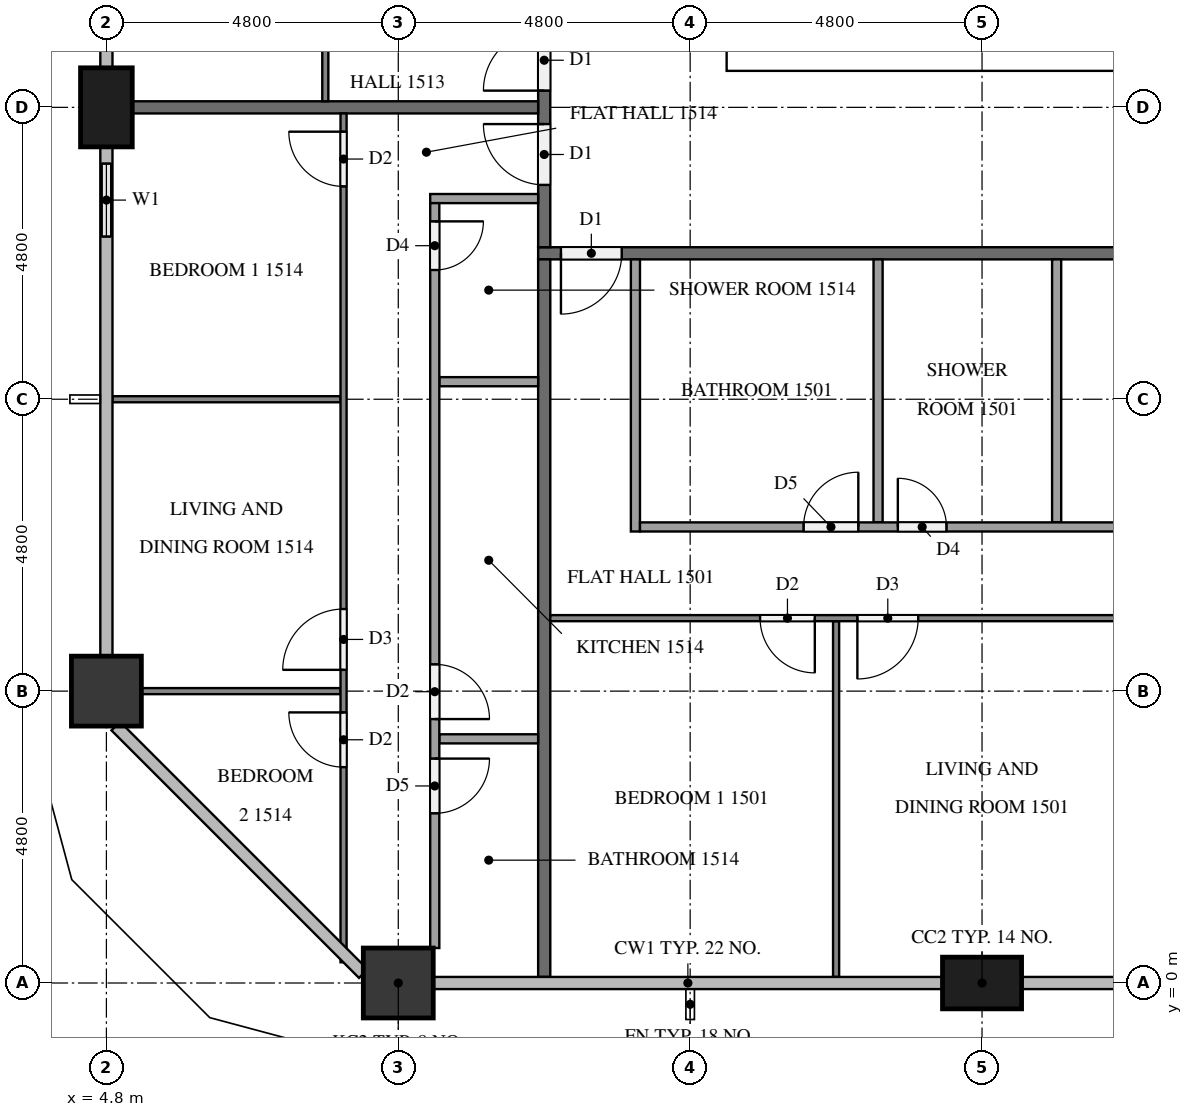
"""IFC4 building model, lengths in metres.
Left out: names, types, materials, properties, quantities, classifications, styles, units other than length and angle.
Written with IfcOpenShell. Run it as: python <this file> out.ifc"""

import sys

from ifc_helpers import new_model, si_unit, direction, frame, frame_2d, origin, origin_2d, place, context, subcontext, project, spatial, rectangle, extrude, element, fill, save


model = new_model("IFC4")
c1 = context("Model", 3, precision=1e-05, world=origin(), true_north=direction((0.0, 1.0)))
c2 = subcontext(c1, "Body", "Model", "MODEL_VIEW")
j1 = project(units=[si_unit("LENGTHUNIT", "METRE"), si_unit("PLANEANGLEUNIT", "RADIAN")], contexts=[c1])
p1 = place(None, origin())
s1 = spatial("IfcSite", under=j1, at=p1, CompositionType="ELEMENT")
p2 = place(p1, origin())
s2 = spatial("IfcBuilding", under=s1, at=p2, CompositionType="ELEMENT")
p3 = place(p2, frame((0.0, 0.0, 62.8)))
s3 = spatial("IfcBuildingStorey", under=s2, at=p3, CompositionType="ELEMENT", Elevation=62.8)
p4 = place(p3, frame((15.0, 15.45, 0.0), z_axis=(0.0, 0.0, 1.0), x_axis=(1.0, 0.0, 0.0)))
e1 = element("IfcWall", 1, at=p4, inside=s3, PredefinedType="SHEAR", context=c2, shape_type="SweptSolid", body=[
    extrude(rectangle(XDim=32.4, YDim=0.9, at=frame_2d((16.2, 0.0))), origin(), (0.0, 0.0, 1.0), 3.2),
])
p5 = place(p4, frame((15.3, 0.0, 0.0)))
e2 = element("IfcOpeningElement", 2, at=p5, cuts=e1, PredefinedType="OPENING", context=c2, shape_type="SweptSolid", body=[
    extrude(rectangle(XDim=1.8, YDim=2.1, at=frame_2d((0.9, 1.05))), frame((0.0, 0.46, 0.0), z_axis=(0.0, -1.0, 0.0), x_axis=(1.0, 0.0, 0.0)), (0.0, 0.0, 1.0), 0.92),
])
p6 = place(p3, frame((9.6, 0.0, 0.0), z_axis=(0.0, 0.0, 1.0), x_axis=(1.0, 0.0, 0.0)))
e3 = element("IfcColumn", 3, at=p6, inside=s3, PredefinedType="COLUMN", context=c2, shape_type="SweptSolid", body=[
    extrude(rectangle(XDim=1.15, YDim=1.15, at=origin_2d()), origin(), (0.0, 0.0, 1.0), 3.2),
])
for number, where, z_axis, x_axis in (
    (4, (19.2, 0.0, 0.0), (0.0, 0.0, 1.0), (1.0, 0.0, 0.0)),
    (5, (4.8, 14.4, 0.0), (0.0, 0.0, 1.0), (0.0, 1.0, 0.0)),
):
    element("IfcColumn", number, at=place(p3, frame(where, z_axis=z_axis, x_axis=x_axis)), inside=s3, PredefinedType="COLUMN", context=c2, shape_type="SweptSolid", body=[
        extrude(rectangle(XDim=1.3, YDim=0.85, at=origin_2d()), origin(), (0.0, 0.0, 1.0), 3.2),
    ])
p7 = place(p3, frame((4.8, 4.8, 0.0), z_axis=(0.0, 0.0, 1.0), x_axis=(1.0, 0.0, 0.0)))
e6 = element("IfcColumn", 6, at=p7, inside=s3, PredefinedType="COLUMN", context=c2, shape_type="SweptSolid", body=[
    extrude(rectangle(XDim=1.15, YDim=1.15, at=origin_2d()), origin(), (0.0, 0.0, 1.0), 3.2),
])
p8 = place(p3, frame((4.8, 13.75, 0.0), z_axis=(0.0, 0.0, 1.0), x_axis=(0.0, -1.0, 0.0)))
e7 = element("IfcWall", 7, at=p8, inside=s3, PredefinedType="SOLIDWALL", context=c2, shape_type="SweptSolid", body=[
    extrude(rectangle(XDim=1.75, YDim=0.15, at=frame_2d((0.875, 0.0))), origin(), (0.0, 0.0, 1.0), 3.2),
])
p9 = place(p8, frame((0.275, 0.0, 0.9)))
e8 = element("IfcOpeningElement", 8, at=p9, cuts=e7, PredefinedType="OPENING", context=c2, shape_type="SweptSolid", body=[
    extrude(rectangle(XDim=1.2, YDim=1.4, at=frame_2d((0.6, 0.7))), frame((0.0, 0.085, 0.0), z_axis=(0.0, -1.0, 0.0), x_axis=(1.0, 0.0, 0.0)), (0.0, 0.0, 1.0), 0.17),
])
p10 = place(p3, frame((50.5, 12.0, 0.0), z_axis=(0.0, 0.0, 1.0), x_axis=(-1.0, 0.0, 0.0)))
e9 = element("IfcWall", 9, at=p10, inside=s3, PredefinedType="PARTITIONING", context=c2, shape_type="SweptSolid", body=[
    extrude(rectangle(XDim=38.6, YDim=0.2, at=frame_2d((19.3, 0.0))), origin(), (0.0, 0.0, 1.0), 3.2),
])
p11 = place(p10, frame((37.225, 0.0, 0.0)))
e10 = element("IfcOpeningElement", 10, at=p11, cuts=e9, PredefinedType="OPENING", context=c2, shape_type="SweptSolid", body=[
    extrude(rectangle(XDim=1.0, YDim=2.1, at=frame_2d((0.5, 1.05))), frame((0.0, 0.11, 0.0), z_axis=(0.0, -1.0, 0.0), x_axis=(1.0, 0.0, 0.0)), (0.0, 0.0, 1.0), 0.22),
])
p12 = place(p10, frame((22.825, 0.0, 0.0)))
e11 = element("IfcOpeningElement", 11, at=p12, cuts=e9, PredefinedType="OPENING", context=c2, shape_type="SweptSolid", body=[
    extrude(rectangle(XDim=1.0, YDim=2.1, at=frame_2d((0.5, 1.05))), frame((0.0, 0.11, 0.0), z_axis=(0.0, -1.0, 0.0), x_axis=(1.0, 0.0, 0.0)), (0.0, 0.0, 1.0), 0.22),
])
p13 = place(p10, frame((0.375, 0.0, 0.0)))
e12 = element("IfcOpeningElement", 12, at=p13, cuts=e9, PredefinedType="OPENING", context=c2, shape_type="SweptSolid", body=[
    extrude(rectangle(XDim=1.0, YDim=2.1, at=frame_2d((0.5, 1.05))), frame((0.0, 0.11, 0.0), z_axis=(0.0, -1.0, 0.0), x_axis=(1.0, 0.0, 0.0)), (0.0, 0.0, 1.0), 0.22),
])
p14 = place(p3, frame((12.0, 12.1, 0.0), z_axis=(0.0, 0.0, 1.0), x_axis=(0.0, 1.0, 0.0)))
e13 = element("IfcWall", 13, at=p14, inside=s3, PredefinedType="PARTITIONING", context=c2, shape_type="SweptSolid", body=[
    extrude(rectangle(XDim=28.6, YDim=0.2, at=frame_2d((14.3, 0.0))), origin(), (0.0, 0.0, 1.0), 3.2),
])
p15 = place(p14, frame((19.375, 0.0, 0.0)))
e14 = element("IfcOpeningElement", 14, at=p15, cuts=e13, PredefinedType="OPENING", context=c2, shape_type="SweptSolid", body=[
    extrude(rectangle(XDim=1.0, YDim=2.1, at=frame_2d((0.5, 1.05))), frame((0.0, 0.11, 0.0), z_axis=(0.0, -1.0, 0.0), x_axis=(1.0, 0.0, 0.0)), (0.0, 0.0, 1.0), 0.22),
])
p16 = place(p14, frame((12.175, 0.0, 0.0)))
e15 = element("IfcOpeningElement", 15, at=p16, cuts=e13, PredefinedType="OPENING", context=c2, shape_type="SweptSolid", body=[
    extrude(rectangle(XDim=1.0, YDim=2.1, at=frame_2d((0.5, 1.05))), frame((0.0, 0.11, 0.0), z_axis=(0.0, -1.0, 0.0), x_axis=(1.0, 0.0, 0.0)), (0.0, 0.0, 1.0), 0.22),
])
p17 = place(p14, frame((2.575, 0.0, 0.0)))
e16 = element("IfcOpeningElement", 16, at=p17, cuts=e13, PredefinedType="OPENING", context=c2, shape_type="SweptSolid", body=[
    extrude(rectangle(XDim=1.0, YDim=2.1, at=frame_2d((0.5, 1.05))), frame((0.0, 0.11, 0.0), z_axis=(0.0, -1.0, 0.0), x_axis=(1.0, 0.0, 0.0)), (0.0, 0.0, 1.0), 0.22),
])
p18 = place(p14, frame((1.025, 0.0, 0.0)))
e17 = element("IfcOpeningElement", 17, at=p18, cuts=e13, PredefinedType="OPENING", context=c2, shape_type="SweptSolid", body=[
    extrude(rectangle(XDim=1.0, YDim=2.1, at=frame_2d((0.5, 1.05))), frame((0.0, 0.11, 0.0), z_axis=(0.0, -1.0, 0.0), x_axis=(1.0, 0.0, 0.0)), (0.0, 0.0, 1.0), 0.22),
])
p19 = place(p3, frame((12.0, 0.1, 0.0), z_axis=(0.0, 0.0, 1.0), x_axis=(0.0, 1.0, 0.0)))
e18 = element("IfcWall", 18, at=p19, inside=s3, PredefinedType="PARTITIONING", context=c2, shape_type="SweptSolid", body=[
    extrude(rectangle(XDim=11.8, YDim=0.2, at=frame_2d((5.9, 0.0))), origin(), (0.0, 0.0, 1.0), 3.2),
])
p20 = place(p3, frame((5.225, 14.4, 0.0), z_axis=(0.0, 0.0, 1.0), x_axis=(1.0, 0.0, 0.0)))
e19 = element("IfcWall", 19, at=p20, inside=s3, PredefinedType="PARTITIONING", context=c2, shape_type="SweptSolid", body=[
    extrude(rectangle(XDim=6.675, YDim=0.2, at=frame_2d((3.337, 0.0))), origin(), (0.0, 0.0, 1.0), 3.2),
])
p21 = place(p3, frame((16.8, 5.95, 0.0), z_axis=(0.0, 0.0, 1.0), x_axis=(0.0, -1.0, 0.0)))
e20 = element("IfcWall", 20, at=p21, inside=s3, PredefinedType="PARTITIONING", context=c2, shape_type="SweptSolid", body=[
    extrude(rectangle(XDim=5.85, YDim=0.1, at=frame_2d((2.925, 0.0))), origin(), (0.0, 0.0, 1.0), 3.2),
])
p22 = place(p3, frame((26.3, 6.0, 0.0), z_axis=(0.0, 0.0, 1.0), x_axis=(-1.0, 0.0, 0.0)))
e21 = element("IfcWall", 21, at=p22, inside=s3, PredefinedType="PARTITIONING", context=c2, shape_type="SweptSolid", body=[
    extrude(rectangle(XDim=14.2, YDim=0.1, at=frame_2d((7.1, 0.0))), origin(), (0.0, 0.0, 1.0), 3.2),
])
p23 = place(p22, frame((9.85, 0.0, 0.0)))
e22 = element("IfcOpeningElement", 22, at=p23, cuts=e21, PredefinedType="OPENING", context=c2, shape_type="SweptSolid", body=[
    extrude(rectangle(XDim=0.9, YDim=2.1, at=frame_2d((0.45, 1.05))), frame((0.0, 0.06, 0.0), z_axis=(0.0, -1.0, 0.0), x_axis=(1.0, 0.0, 0.0)), (0.0, 0.0, 1.0), 0.12),
])
p24 = place(p22, frame((8.15, 0.0, 0.0)))
e23 = element("IfcOpeningElement", 23, at=p24, cuts=e21, PredefinedType="OPENING", context=c2, shape_type="SweptSolid", body=[
    extrude(rectangle(XDim=1.0, YDim=2.1, at=frame_2d((0.5, 1.05))), frame((0.0, 0.06, 0.0), z_axis=(0.0, -1.0, 0.0), x_axis=(1.0, 0.0, 0.0)), (0.0, 0.0, 1.0), 0.12),
])
p25 = place(p22, frame((0.3, 0.0, 0.0)))
e24 = element("IfcOpeningElement", 24, at=p25, cuts=e21, PredefinedType="OPENING", context=c2, shape_type="SweptSolid", body=[
    extrude(rectangle(XDim=0.9, YDim=2.1, at=frame_2d((0.45, 1.05))), frame((0.0, 0.06, 0.0), z_axis=(0.0, -1.0, 0.0), x_axis=(1.0, 0.0, 0.0)), (0.0, 0.0, 1.0), 0.12),
])
for number, where, z_axis, x_axis in (
    (25, (17.49, 11.9, 0.0), (0.0, 0.0, 1.0), (0.0, -1.0, 0.0)),
    (26, (20.427, 11.9, 0.0), (0.0, 0.0, 1.0), (0.0, -1.0, 0.0)),
):
    element("IfcWall", number, at=place(p3, frame(where, z_axis=z_axis, x_axis=x_axis)), inside=s3, PredefinedType="PARTITIONING", context=c2, shape_type="SweptSolid", body=[
        extrude(rectangle(XDim=4.325, YDim=0.15, at=frame_2d((2.163, 0.0))), origin(), (0.0, 0.0, 1.0), 3.2),
    ])
p26 = place(p3, frame((13.5, 11.9, 0.0), z_axis=(0.0, 0.0, 1.0), x_axis=(0.0, -1.0, 0.0)))
e27 = element("IfcWall", 27, at=p26, inside=s3, PredefinedType="PARTITIONING", context=c2, shape_type="SweptSolid", body=[
    extrude(rectangle(XDim=4.475, YDim=0.15, at=frame_2d((2.237, 0.0))), origin(), (0.0, 0.0, 1.0), 3.2),
])
p27 = place(p3, frame((13.575, 7.5, 0.0), z_axis=(0.0, 0.0, 1.0), x_axis=(1.0, 0.0, 0.0)))
e28 = element("IfcWall", 28, at=p27, inside=s3, PredefinedType="PARTITIONING", context=c2, shape_type="SweptSolid", body=[
    extrude(rectangle(XDim=12.725, YDim=0.15, at=frame_2d((6.363, 0.0))), origin(), (0.0, 0.0, 1.0), 3.2),
])
p28 = place(p27, frame((2.69, 0.0, 0.0)))
e29 = element("IfcOpeningElement", 29, at=p28, cuts=e28, PredefinedType="OPENING", context=c2, shape_type="SweptSolid", body=[
    extrude(rectangle(XDim=0.9, YDim=2.1, at=frame_2d((0.45, 1.05))), frame((0.0, 0.085, 0.0), z_axis=(0.0, -1.0, 0.0), x_axis=(1.0, 0.0, 0.0)), (0.0, 0.0, 1.0), 0.17),
])
p29 = place(p27, frame((4.24, 0.0, 0.0)))
e30 = element("IfcOpeningElement", 30, at=p29, cuts=e28, PredefinedType="OPENING", context=c2, shape_type="SweptSolid", body=[
    extrude(rectangle(XDim=0.8, YDim=2.1, at=frame_2d((0.4, 1.05))), frame((0.0, 0.085, 0.0), z_axis=(0.0, -1.0, 0.0), x_axis=(1.0, 0.0, 0.0)), (0.0, 0.0, 1.0), 0.17),
])
p30 = place(p27, frame((11.475, 0.0, 0.0)))
e31 = element("IfcOpeningElement", 31, at=p30, cuts=e28, PredefinedType="OPENING", context=c2, shape_type="SweptSolid", body=[
    extrude(rectangle(XDim=0.9, YDim=2.1, at=frame_2d((0.45, 1.05))), frame((0.0, 0.085, 0.0), z_axis=(0.0, -1.0, 0.0), x_axis=(1.0, 0.0, 0.0)), (0.0, 0.0, 1.0), 0.17),
])
p31 = place(p3, frame((8.4, 14.5, 0.0), z_axis=(0.0, 0.0, 1.0), x_axis=(0.0, 1.0, 0.0)))
e32 = element("IfcWall", 32, at=p31, inside=s3, PredefinedType="PARTITIONING", context=c2, shape_type="SweptSolid", body=[
    extrude(rectangle(XDim=9.4, YDim=0.1, at=frame_2d((4.7, 0.0))), origin(), (0.0, 0.0, 1.0), 3.2),
])
p32 = place(p31, frame((3.35, 0.0, 0.0)))
e33 = element("IfcOpeningElement", 33, at=p32, cuts=e32, PredefinedType="OPENING", context=c2, shape_type="SweptSolid", body=[
    extrude(rectangle(XDim=1.0, YDim=2.1, at=frame_2d((0.5, 1.05))), frame((0.0, 0.06, 0.0), z_axis=(0.0, -1.0, 0.0), x_axis=(1.0, 0.0, 0.0)), (0.0, 0.0, 1.0), 0.12),
])
p33 = place(p31, frame((5.05, 0.0, 0.0)))
e34 = element("IfcOpeningElement", 34, at=p33, cuts=e32, PredefinedType="OPENING", context=c2, shape_type="SweptSolid", body=[
    extrude(rectangle(XDim=0.9, YDim=2.1, at=frame_2d((0.45, 1.05))), frame((0.0, 0.06, 0.0), z_axis=(0.0, -1.0, 0.0), x_axis=(1.0, 0.0, 0.0)), (0.0, 0.0, 1.0), 0.12),
])
p34 = place(p3, frame((8.65, 9.6, 0.0), z_axis=(0.0, 0.0, 1.0), x_axis=(-1.0, 0.0, 0.0)))
e35 = element("IfcWall", 35, at=p34, inside=s3, PredefinedType="PARTITIONING", context=c2, shape_type="SweptSolid", body=[
    extrude(rectangle(XDim=3.75, YDim=0.1, at=frame_2d((1.875, 0.0))), origin(), (0.0, 0.0, 1.0), 3.2),
])
p35 = place(p3, frame((8.65, 4.8, 0.0), z_axis=(0.0, 0.0, 1.0), x_axis=(-1.0, 0.0, 0.0)))
e36 = element("IfcWall", 36, at=p35, inside=s3, PredefinedType="PARTITIONING", context=c2, shape_type="SweptSolid", body=[
    extrude(rectangle(XDim=3.275, YDim=0.1, at=frame_2d((1.637, 0.0))), origin(), (0.0, 0.0, 1.0), 3.2),
])
p36 = place(p3, frame((8.7, 0.341, 0.0), z_axis=(0.0, 0.0, 1.0), x_axis=(0.0, 1.0, 0.0)))
e37 = element("IfcWall", 37, at=p36, inside=s3, PredefinedType="PARTITIONING", context=c2, shape_type="SweptSolid", body=[
    extrude(rectangle(XDim=13.959, YDim=0.1, at=frame_2d((6.979, 0.0))), origin(), (0.0, 0.0, 1.0), 3.2),
])
p37 = place(p36, frame((12.759, 0.0, 0.0)))
e38 = element("IfcOpeningElement", 38, at=p37, cuts=e37, PredefinedType="OPENING", context=c2, shape_type="SweptSolid", body=[
    extrude(rectangle(XDim=0.9, YDim=2.1, at=frame_2d((0.45, 1.05))), frame((0.0, 0.06, 0.0), z_axis=(0.0, -1.0, 0.0), x_axis=(1.0, 0.0, 0.0)), (0.0, 0.0, 1.0), 0.12),
])
p38 = place(p36, frame((4.809, 0.0, 0.0)))
e39 = element("IfcOpeningElement", 39, at=p38, cuts=e37, PredefinedType="OPENING", context=c2, shape_type="SweptSolid", body=[
    extrude(rectangle(XDim=1.0, YDim=2.1, at=frame_2d((0.5, 1.05))), frame((0.0, 0.06, 0.0), z_axis=(0.0, -1.0, 0.0), x_axis=(1.0, 0.0, 0.0)), (0.0, 0.0, 1.0), 0.12),
])
p39 = place(p36, frame((3.209, 0.0, 0.0)))
e40 = element("IfcOpeningElement", 40, at=p39, cuts=e37, PredefinedType="OPENING", context=c2, shape_type="SweptSolid", body=[
    extrude(rectangle(XDim=0.9, YDim=2.1, at=frame_2d((0.45, 1.05))), frame((0.0, 0.06, 0.0), z_axis=(0.0, -1.0, 0.0), x_axis=(1.0, 0.0, 0.0)), (0.0, 0.0, 1.0), 0.12),
])
for number, where, z_axis, x_axis in (
    (41, (11.9, 9.888, 0.0), (0.0, 0.0, 1.0), (-1.0, 0.0, 0.0)),
    (42, (11.9, 4.015, 0.0), (0.0, 0.0, 1.0), (-1.0, 0.0, 0.0)),
):
    element("IfcWall", number, at=place(p3, frame(where, z_axis=z_axis, x_axis=x_axis)), inside=s3, PredefinedType="PARTITIONING", context=c2, shape_type="SweptSolid", body=[
        extrude(rectangle(XDim=1.625, YDim=0.15, at=frame_2d((0.812, 0.0))), origin(), (0.0, 0.0, 1.0), 3.2),
    ])
p40 = place(p3, frame((11.9, 12.9, 0.0), z_axis=(0.0, 0.0, 1.0), x_axis=(-1.0, 0.0, 0.0)))
e43 = element("IfcWall", 43, at=p40, inside=s3, PredefinedType="PARTITIONING", context=c2, shape_type="SweptSolid", body=[
    extrude(rectangle(XDim=1.775, YDim=0.15, at=frame_2d((0.887, 0.0))), origin(), (0.0, 0.0, 1.0), 3.2),
])
p41 = place(p3, frame((10.2, 12.825, 0.0), z_axis=(0.0, 0.0, 1.0), x_axis=(0.0, -1.0, 0.0)))
e44 = element("IfcWall", 44, at=p41, inside=s3, PredefinedType="PARTITIONING", context=c2, shape_type="SweptSolid", body=[
    extrude(rectangle(XDim=12.25, YDim=0.15, at=frame_2d((6.125, 0.0))), origin(), (0.0, 0.0, 1.0), 3.2),
])
p42 = place(p41, frame((0.3, 0.0, 0.0)))
e45 = element("IfcOpeningElement", 45, at=p42, cuts=e44, PredefinedType="OPENING", context=c2, shape_type="SweptSolid", body=[
    extrude(rectangle(XDim=0.8, YDim=2.1, at=frame_2d((0.4, 1.05))), frame((0.0, 0.085, 0.0), z_axis=(0.0, -1.0, 0.0), x_axis=(1.0, 0.0, 0.0)), (0.0, 0.0, 1.0), 0.17),
])
p43 = place(p41, frame((7.585, 0.0, 0.0)))
e46 = element("IfcOpeningElement", 46, at=p43, cuts=e44, PredefinedType="OPENING", context=c2, shape_type="SweptSolid", body=[
    extrude(rectangle(XDim=0.9, YDim=2.1, at=frame_2d((0.45, 1.05))), frame((0.0, 0.085, 0.0), z_axis=(0.0, -1.0, 0.0), x_axis=(1.0, 0.0, 0.0)), (0.0, 0.0, 1.0), 0.17),
])
p44 = place(p41, frame((9.135, 0.0, 0.0)))
e47 = element("IfcOpeningElement", 47, at=p44, cuts=e44, PredefinedType="OPENING", context=c2, shape_type="SweptSolid", body=[
    extrude(rectangle(XDim=0.9, YDim=2.1, at=frame_2d((0.45, 1.05))), frame((0.0, 0.085, 0.0), z_axis=(0.0, -1.0, 0.0), x_axis=(1.0, 0.0, 0.0)), (0.0, 0.0, 1.0), 0.17),
])
p45 = place(p9, origin())
e48 = element("IfcWindow", 48, at=p45, inside=s3, PartitioningType="SINGLE_PANEL", PredefinedType="WINDOW", context=c2, shape_type="SweptSolid", body=[
    extrude(rectangle(XDim=1.2, YDim=1.4, at=frame_2d((0.6, 0.7))), frame((0.0, 0.03, 0.0), z_axis=(0.0, -1.0, 0.0), x_axis=(1.0, 0.0, 0.0)), (0.0, 0.0, 1.0), 0.06),
])
fill(e8, e48)
p46 = place(p11, origin())
e49 = element("IfcDoor", 49, at=p46, inside=s3, OperationType="SINGLE_SWING_RIGHT", PredefinedType="DOOR", context=c2, shape_type="SweptSolid", body=[
    extrude(rectangle(XDim=1.0, YDim=2.1, at=frame_2d((0.5, 1.05))), frame((0.0, 0.025, 0.0), z_axis=(0.0, -1.0, 0.0), x_axis=(1.0, 0.0, 0.0)), (0.0, 0.0, 1.0), 0.05),
])
fill(e10, e49)
p47 = place(p17, origin())
e50 = element("IfcDoor", 50, at=p47, inside=s3, OperationType="SINGLE_SWING_LEFT", PredefinedType="DOOR", context=c2, shape_type="SweptSolid", body=[
    extrude(rectangle(XDim=1.0, YDim=2.1, at=frame_2d((0.5, 1.05))), frame((0.0, 0.025, 0.0), z_axis=(0.0, -1.0, 0.0), x_axis=(1.0, 0.0, 0.0)), (0.0, 0.0, 1.0), 0.05),
])
fill(e16, e50)
p48 = place(p18, origin())
e51 = element("IfcDoor", 51, at=p48, inside=s3, OperationType="SINGLE_SWING_RIGHT", PredefinedType="DOOR", context=c2, shape_type="SweptSolid", body=[
    extrude(rectangle(XDim=1.0, YDim=2.1, at=frame_2d((0.5, 1.05))), frame((0.0, 0.025, 0.0), z_axis=(0.0, -1.0, 0.0), x_axis=(1.0, 0.0, 0.0)), (0.0, 0.0, 1.0), 0.05),
])
fill(e17, e51)
p49 = place(p23, origin())
e52 = element("IfcDoor", 52, at=p49, inside=s3, OperationType="SINGLE_SWING_LEFT", PredefinedType="DOOR", context=c2, shape_type="SweptSolid", body=[
    extrude(rectangle(XDim=0.9, YDim=2.1, at=frame_2d((0.45, 1.05))), frame((0.0, 0.025, 0.0), z_axis=(0.0, -1.0, 0.0), x_axis=(1.0, 0.0, 0.0)), (0.0, 0.0, 1.0), 0.05),
])
fill(e22, e52)
p50 = place(p24, origin())
e53 = element("IfcDoor", 53, at=p50, inside=s3, OperationType="SINGLE_SWING_RIGHT", PredefinedType="DOOR", context=c2, shape_type="SweptSolid", body=[
    extrude(rectangle(XDim=1.0, YDim=2.1, at=frame_2d((0.5, 1.05))), frame((0.0, 0.025, 0.0), z_axis=(0.0, -1.0, 0.0), x_axis=(1.0, 0.0, 0.0)), (0.0, 0.0, 1.0), 0.05),
])
fill(e23, e53)
p51 = place(p28, origin())
e54 = element("IfcDoor", 54, at=p51, inside=s3, OperationType="SINGLE_SWING_RIGHT", PredefinedType="DOOR", context=c2, shape_type="SweptSolid", body=[
    extrude(rectangle(XDim=0.9, YDim=2.1, at=frame_2d((0.45, 1.05))), frame((0.0, 0.025, 0.0), z_axis=(0.0, -1.0, 0.0), x_axis=(1.0, 0.0, 0.0)), (0.0, 0.0, 1.0), 0.05),
])
fill(e29, e54)
p52 = place(p29, origin())
e55 = element("IfcDoor", 55, at=p52, inside=s3, OperationType="SINGLE_SWING_LEFT", PredefinedType="DOOR", context=c2, shape_type="SweptSolid", body=[
    extrude(rectangle(XDim=0.8, YDim=2.1, at=frame_2d((0.4, 1.05))), frame((0.0, 0.025, 0.0), z_axis=(0.0, -1.0, 0.0), x_axis=(1.0, 0.0, 0.0)), (0.0, 0.0, 1.0), 0.05),
])
fill(e30, e55)
p53 = place(p37, origin())
e56 = element("IfcDoor", 56, at=p53, inside=s3, OperationType="SINGLE_SWING_RIGHT", PredefinedType="DOOR", context=c2, shape_type="SweptSolid", body=[
    extrude(rectangle(XDim=0.9, YDim=2.1, at=frame_2d((0.45, 1.05))), frame((0.0, 0.025, 0.0), z_axis=(0.0, -1.0, 0.0), x_axis=(1.0, 0.0, 0.0)), (0.0, 0.0, 1.0), 0.05),
])
fill(e38, e56)
p54 = place(p38, origin())
e57 = element("IfcDoor", 57, at=p54, inside=s3, OperationType="SINGLE_SWING_LEFT", PredefinedType="DOOR", context=c2, shape_type="SweptSolid", body=[
    extrude(rectangle(XDim=1.0, YDim=2.1, at=frame_2d((0.5, 1.05))), frame((0.0, 0.025, 0.0), z_axis=(0.0, -1.0, 0.0), x_axis=(1.0, 0.0, 0.0)), (0.0, 0.0, 1.0), 0.05),
])
fill(e39, e57)
p55 = place(p39, origin())
e58 = element("IfcDoor", 58, at=p55, inside=s3, OperationType="SINGLE_SWING_RIGHT", PredefinedType="DOOR", context=c2, shape_type="SweptSolid", body=[
    extrude(rectangle(XDim=0.9, YDim=2.1, at=frame_2d((0.45, 1.05))), frame((0.0, 0.025, 0.0), z_axis=(0.0, -1.0, 0.0), x_axis=(1.0, 0.0, 0.0)), (0.0, 0.0, 1.0), 0.05),
])
fill(e40, e58)
p56 = place(p42, origin())
e59 = element("IfcDoor", 59, at=p56, inside=s3, OperationType="SINGLE_SWING_LEFT", PredefinedType="DOOR", context=c2, shape_type="SweptSolid", body=[
    extrude(rectangle(XDim=0.8, YDim=2.1, at=frame_2d((0.4, 1.05))), frame((0.0, 0.025, 0.0), z_axis=(0.0, -1.0, 0.0), x_axis=(1.0, 0.0, 0.0)), (0.0, 0.0, 1.0), 0.05),
])
fill(e45, e59)
p57 = place(p43, origin())
e60 = element("IfcDoor", 60, at=p57, inside=s3, OperationType="SINGLE_SWING_RIGHT", PredefinedType="DOOR", context=c2, shape_type="SweptSolid", body=[
    extrude(rectangle(XDim=0.9, YDim=2.1, at=frame_2d((0.45, 1.05))), frame((0.0, 0.025, 0.0), z_axis=(0.0, -1.0, 0.0), x_axis=(1.0, 0.0, 0.0)), (0.0, 0.0, 1.0), 0.05),
])
fill(e46, e60)
p58 = place(p44, origin())
e61 = element("IfcDoor", 61, at=p58, inside=s3, OperationType="SINGLE_SWING_LEFT", PredefinedType="DOOR", context=c2, shape_type="SweptSolid", body=[
    extrude(rectangle(XDim=0.9, YDim=2.1, at=frame_2d((0.45, 1.05))), frame((0.0, 0.025, 0.0), z_axis=(0.0, -1.0, 0.0), x_axis=(1.0, 0.0, 0.0)), (0.0, 0.0, 1.0), 0.05),
])
fill(e47, e61)
save(model, sys.argv[1])
